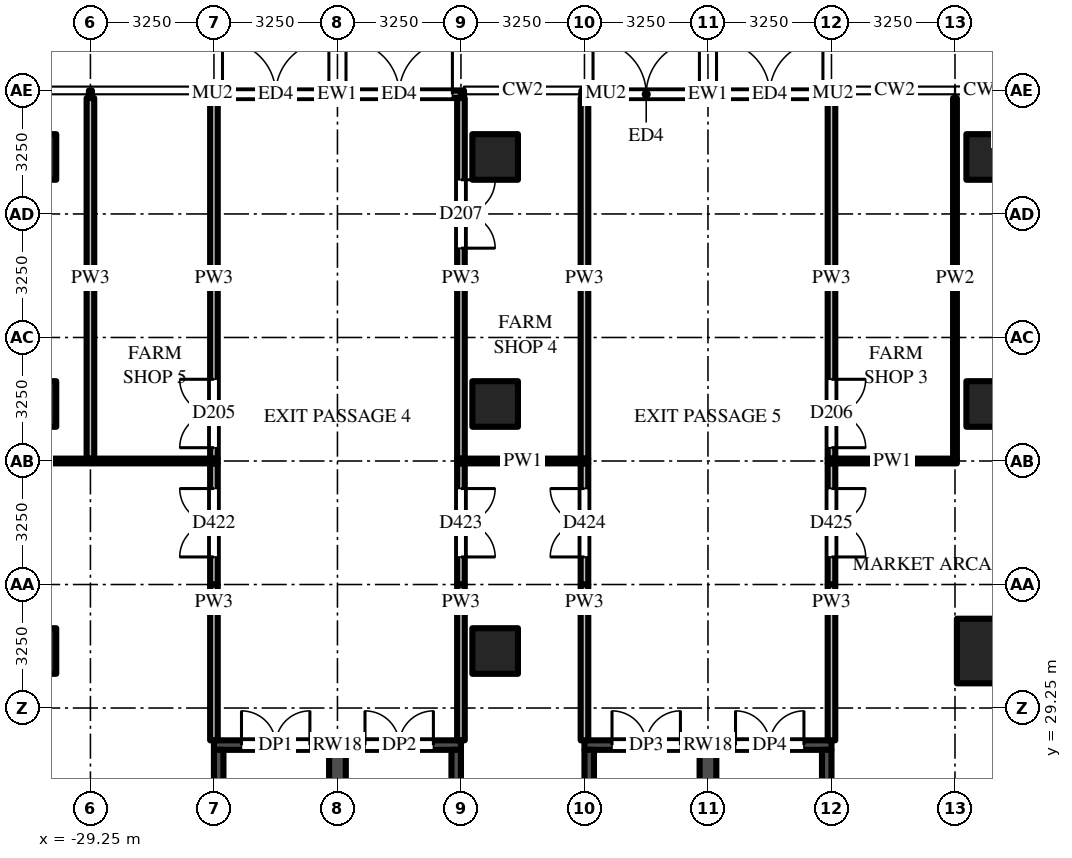
"""IFC4 building model, lengths in metres.
Left out: names, types, materials, properties, quantities, classifications, styles, units other than length and angle.
Written with IfcOpenShell. Run it as: python <this file> out.ifc"""

import sys

from ifc_helpers import new_model, si_unit, direction, frame, frame_2d, origin, origin_2d, place, context, subcontext, project, spatial, rectangle, extrude, source, transform, mapped, element, fill, save


model = new_model("IFC4")
c1 = context("Model", 3, precision=1e-05, world=origin(), true_north=direction((0.0, 1.0)))
c2 = subcontext(c1, "Body", "Model", "MODEL_VIEW")
j1 = project(units=[si_unit("LENGTHUNIT", "METRE"), si_unit("PLANEANGLEUNIT", "RADIAN")], contexts=[c1])
p1 = place(None, origin())
s1 = spatial("IfcSite", under=j1, at=p1, CompositionType="ELEMENT")
p2 = place(p1, origin())
s2 = spatial("IfcBuilding", under=s1, at=p2, CompositionType="ELEMENT")
p3 = place(p2, origin())
s3 = spatial("IfcBuildingStorey", under=s2, at=p3, CompositionType="ELEMENT", Elevation=0.0)
m1 = source(origin(), c2, "Body", "SweptSolid", [
    extrude(rectangle(XDim=1.7, YDim=1.7, at=origin_2d()), origin(), (0.0, 0.0, 1.0), 8.5),
])
p4 = place(p3, frame((-5.6, 30.75, -0.5), z_axis=(0.0, 0.0, 1.0), x_axis=(1.0, 0.0, 0.0)))
e1 = element("IfcColumn", 1, at=p4, inside=s3, PredefinedType="COLUMN", context=c2, shape_type="MappedRepresentation", body=[
    mapped(m1, transform((0.0, 0.0, 0.0))),
])
m2 = source(origin(), c2, "Body", "SweptSolid", [
    extrude(rectangle(XDim=1.2, YDim=1.2, at=origin_2d()), origin(), (0.0, 0.0, 1.0), 8.5),
])
for number, where, z_axis, x_axis in (
    (2, (-5.6, 37.25, -0.5), (0.0, 0.0, 1.0), (1.0, 0.0, 0.0)),
    (3, (-5.6, 43.75, -0.5), (0.0, 0.0, 1.0), (1.0, 0.0, 0.0)),
    (4, (-18.6, 30.75, -0.5), (0.0, 0.0, 1.0), (1.0, 0.0, 0.0)),
    (5, (-18.6, 37.25, -0.5), (0.0, 0.0, 1.0), (1.0, 0.0, 0.0)),
    (6, (-18.6, 43.75, -0.5), (0.0, 0.0, 1.0), (1.0, 0.0, 0.0)),
    (7, (-30.75, 30.75, -0.5), (0.0, 0.0, 1.0), (1.0, 0.0, 0.0)),
    (8, (-30.75, 37.25, -0.5), (0.0, 0.0, 1.0), (1.0, 0.0, 0.0)),
    (9, (-30.75, 43.75, -0.5), (0.0, 0.0, 1.0), (1.0, 0.0, 0.0)),
):
    element("IfcColumn", number, at=place(p3, frame(where, z_axis=z_axis, x_axis=x_axis)), inside=s3, PredefinedType="COLUMN", context=c2, shape_type="MappedRepresentation", body=[
        mapped(m2, transform((0.0, 0.0, 0.0))),
    ])
m3 = source(origin(), c2, "Body", "SweptSolid", [
    extrude(rectangle(XDim=6.5, YDim=0.25, at=frame_2d((3.25, 0.0))), origin(), (0.0, 0.0, 1.0), 7.7),
])
p5 = place(p3, frame((-26.0, 28.275, 0.0), z_axis=(0.0, 0.0, 1.0), x_axis=(1.0, 0.0, 0.0)))
e10 = element("IfcWall", 10, at=p5, inside=s3, PredefinedType="SHEAR", context=c2, shape_type="MappedRepresentation", body=[
    mapped(m3, transform((0.0, 0.0, 0.0))),
])
m4 = source(origin(), c2, "Body", "SweptSolid", [
    extrude(rectangle(XDim=1.8, YDim=2.1, at=frame_2d((0.9, 1.05))), frame((0.0, 0.135, 0.0), z_axis=(0.0, -1.0, 0.0), x_axis=(1.0, 0.0, 0.0)), (0.0, 0.0, 1.0), 0.27),
])
p6 = place(p5, frame((0.725, 0.0, 0.0)))
e11 = element("IfcOpeningElement", 11, at=p6, cuts=e10, PredefinedType="OPENING", context=c2, shape_type="MappedRepresentation", body=[
    mapped(m4, transform((0.0, 0.0, 0.0))),
])
p7 = place(p5, frame((3.975, 0.0, 0.0)))
e12 = element("IfcOpeningElement", 12, at=p7, cuts=e10, PredefinedType="OPENING", context=c2, shape_type="MappedRepresentation", body=[
    mapped(m4, transform((0.0, 0.0, 0.0))),
])
m5 = source(origin(), c2, "Body", "SweptSolid", [
    extrude(rectangle(XDim=8.3, YDim=0.25, at=frame_2d((4.15, 0.0))), origin(), (0.0, 0.0, 1.0), 7.7),
])
for number, where, z_axis, x_axis in (
    (13, (-25.875, 19.85, 0.0), (0.0, 0.0, 1.0), (0.0, 1.0, 0.0)),
    (14, (-19.625, 19.85, 0.0), (0.0, 0.0, 1.0), (0.0, 1.0, 0.0)),
):
    element("IfcWall", number, at=place(p3, frame(where, z_axis=z_axis, x_axis=x_axis)), inside=s3, PredefinedType="SHEAR", context=c2, shape_type="MappedRepresentation", body=[
        mapped(m5, transform((0.0, 0.0, 0.0))),
    ])
m6 = source(origin(), c2, "Body", "SweptSolid", [
    extrude(rectangle(XDim=8.3, YDim=0.44, at=frame_2d((4.15, 0.0))), origin(), (0.0, 0.0, 1.0), 7.7),
])
p8 = place(p3, frame((-22.75, 19.85, 0.0), z_axis=(0.0, 0.0, 1.0), x_axis=(0.0, 1.0, 0.0)))
e15 = element("IfcWall", 15, at=p8, inside=s3, PredefinedType="SHEAR", context=c2, shape_type="MappedRepresentation", body=[
    mapped(m6, transform((0.0, 0.0, 0.0))),
])
p9 = place(p3, frame((-16.25, 28.275, 0.0), z_axis=(0.0, 0.0, 1.0), x_axis=(1.0, 0.0, 0.0)))
e16 = element("IfcWall", 16, at=p9, inside=s3, PredefinedType="SHEAR", context=c2, shape_type="MappedRepresentation", body=[
    mapped(m3, transform((0.0, 0.0, 0.0))),
])
p10 = place(p9, frame((0.725, 0.0, 0.0)))
e17 = element("IfcOpeningElement", 17, at=p10, cuts=e16, PredefinedType="OPENING", context=c2, shape_type="MappedRepresentation", body=[
    mapped(m4, transform((0.0, 0.0, 0.0))),
])
p11 = place(p9, frame((3.975, 0.0, 0.0)))
e18 = element("IfcOpeningElement", 18, at=p11, cuts=e16, PredefinedType="OPENING", context=c2, shape_type="MappedRepresentation", body=[
    mapped(m4, transform((0.0, 0.0, 0.0))),
])
for number, where, z_axis, x_axis in (
    (19, (-16.125, 19.85, 0.0), (0.0, 0.0, 1.0), (0.0, 1.0, 0.0)),
    (20, (-9.875, 19.85, 0.0), (0.0, 0.0, 1.0), (0.0, 1.0, 0.0)),
):
    element("IfcWall", number, at=place(p3, frame(where, z_axis=z_axis, x_axis=x_axis)), inside=s3, PredefinedType="SHEAR", context=c2, shape_type="MappedRepresentation", body=[
        mapped(m5, transform((0.0, 0.0, 0.0))),
    ])
p12 = place(p3, frame((-13.0, 19.85, 0.0), z_axis=(0.0, 0.0, 1.0), x_axis=(0.0, 1.0, 0.0)))
e21 = element("IfcWall", 21, at=p12, inside=s3, PredefinedType="SHEAR", context=c2, shape_type="MappedRepresentation", body=[
    mapped(m6, transform((0.0, 0.0, 0.0))),
])
m7 = source(origin(), c2, "Body", "SweptSolid", [
    extrude(rectangle(XDim=3.25, YDim=0.2, at=frame_2d((1.625, 0.0))), origin(), (0.0, 0.0, 1.0), 7.7),
])
p13 = place(p3, frame((-13.0, 45.4, 0.0), z_axis=(0.0, 0.0, 1.0), x_axis=(1.0, 0.0, 0.0)))
e22 = element("IfcWall", 22, at=p13, inside=s3, PredefinedType="SOLIDWALL", context=c2, shape_type="MappedRepresentation", body=[
    mapped(m7, transform((0.0, 0.0, 0.0))),
])
m8 = source(origin(), c2, "Body", "SweptSolid", [
    extrude(rectangle(XDim=2.8, YDim=2.4, at=frame_2d((1.4, 1.2))), frame((0.0, 0.11, 0.0), z_axis=(0.0, -1.0, 0.0), x_axis=(1.0, 0.0, 0.0)), (0.0, 0.0, 1.0), 0.22),
])
p14 = place(p13, frame((0.225, 0.0, 0.0)))
e23 = element("IfcOpeningElement", 23, at=p14, cuts=e22, PredefinedType="OPENING", context=c2, shape_type="MappedRepresentation", body=[
    mapped(m8, transform((0.0, 0.0, 0.0))),
])
p15 = place(p3, frame((-16.25, 45.4, 0.0), z_axis=(0.0, 0.0, 1.0), x_axis=(1.0, 0.0, 0.0)))
e24 = element("IfcWall", 24, at=p15, inside=s3, PredefinedType="SOLIDWALL", context=c2, shape_type="MappedRepresentation", body=[
    mapped(m7, transform((0.0, 0.0, 0.0))),
])
p16 = place(p15, frame((0.225, 0.0, 0.0)))
e25 = element("IfcOpeningElement", 25, at=p16, cuts=e24, PredefinedType="OPENING", context=c2, shape_type="MappedRepresentation", body=[
    mapped(m8, transform((0.0, 0.0, 0.0))),
])
p17 = place(p3, frame((-22.75, 45.4, 0.0), z_axis=(0.0, 0.0, 1.0), x_axis=(1.0, 0.0, 0.0)))
e26 = element("IfcWall", 26, at=p17, inside=s3, PredefinedType="SOLIDWALL", context=c2, shape_type="MappedRepresentation", body=[
    mapped(m7, transform((0.0, 0.0, 0.0))),
])
p18 = place(p17, frame((0.225, 0.0, 0.0)))
e27 = element("IfcOpeningElement", 27, at=p18, cuts=e26, PredefinedType="OPENING", context=c2, shape_type="MappedRepresentation", body=[
    mapped(m8, transform((0.0, 0.0, 0.0))),
])
p19 = place(p3, frame((-26.0, 45.4, 0.0), z_axis=(0.0, 0.0, 1.0), x_axis=(1.0, 0.0, 0.0)))
e28 = element("IfcWall", 28, at=p19, inside=s3, PredefinedType="SOLIDWALL", context=c2, shape_type="MappedRepresentation", body=[
    mapped(m7, transform((0.0, 0.0, 0.0))),
])
p20 = place(p19, frame((0.225, 0.0, 0.0)))
e29 = element("IfcOpeningElement", 29, at=p20, cuts=e28, PredefinedType="OPENING", context=c2, shape_type="MappedRepresentation", body=[
    mapped(m8, transform((0.0, 0.0, 0.0))),
])
m9 = source(origin(), c2, "Body", "SweptSolid", [
    extrude(rectangle(XDim=9.488, YDim=0.2, at=frame_2d((4.744, 0.0))), origin(), (0.0, 0.0, 1.0), 6.839),
])
p21 = place(p3, frame((-29.25, 35.812, 0.0), z_axis=(0.0, 0.0, 1.0), x_axis=(0.0, 1.0, 0.0)))
e30 = element("IfcWall", 30, at=p21, inside=s3, PredefinedType="PARTITIONING", context=c2, shape_type="MappedRepresentation", body=[
    mapped(m9, transform((0.0, 0.0, 0.0))),
])
m10 = source(origin(), c2, "Body", "SweptSolid", [
    extrude(rectangle(XDim=3.188, YDim=0.2, at=frame_2d((1.594, 0.0))), origin(), (0.0, 0.0, 1.0), 6.997),
])
p22 = place(p3, frame((-26.0, 32.5, 0.0), z_axis=(0.0, 0.0, 1.0), x_axis=(0.0, 1.0, 0.0)))
e31 = element("IfcWall", 31, at=p22, inside=s3, PredefinedType="PARTITIONING", context=c2, shape_type="MappedRepresentation", body=[
    mapped(m10, transform((0.0, 0.0, 0.0))),
])
m11 = source(origin(), c2, "Body", "SweptSolid", [
    extrude(rectangle(XDim=1.8, YDim=2.1, at=frame_2d((0.9, 1.05))), frame((0.0, 0.11, 0.0), z_axis=(0.0, -1.0, 0.0), x_axis=(1.0, 0.0, 0.0)), (0.0, 0.0, 1.0), 0.22),
])
p23 = place(p22, frame((0.725, 0.0, 0.0)))
e32 = element("IfcOpeningElement", 32, at=p23, cuts=e31, PredefinedType="OPENING", context=c2, shape_type="MappedRepresentation", body=[
    mapped(m11, transform((0.0, 0.0, 0.0))),
])
m12 = source(origin(), c2, "Body", "SweptSolid", [
    extrude(rectangle(XDim=4.1, YDim=0.2, at=frame_2d((2.05, 0.0))), origin(), (0.0, 0.0, 1.0), 6.839),
])
p24 = place(p3, frame((-26.0, 32.5, 0.0), z_axis=(0.0, 0.0, 1.0), x_axis=(0.0, -1.0, 0.0)))
e33 = element("IfcWall", 33, at=p24, inside=s3, PredefinedType="PARTITIONING", context=c2, shape_type="MappedRepresentation", body=[
    mapped(m12, transform((0.0, 0.0, 0.0))),
])
p25 = place(p3, frame((-26.0, 35.812, 0.0), z_axis=(0.0, 0.0, 1.0), x_axis=(0.0, 1.0, 0.0)))
e34 = element("IfcWall", 34, at=p25, inside=s3, PredefinedType="PARTITIONING", context=c2, shape_type="MappedRepresentation", body=[
    mapped(m9, transform((0.0, 0.0, 0.0))),
])
p26 = place(p25, frame((0.288, 0.0, 0.0)))
e35 = element("IfcOpeningElement", 35, at=p26, cuts=e34, PredefinedType="OPENING", context=c2, shape_type="MappedRepresentation", body=[
    mapped(m11, transform((0.0, 0.0, 0.0))),
])
p27 = place(p3, frame((-19.5, 35.688, 0.0), z_axis=(0.0, 0.0, 1.0), x_axis=(0.0, -1.0, 0.0)))
e36 = element("IfcWall", 36, at=p27, inside=s3, PredefinedType="PARTITIONING", context=c2, shape_type="MappedRepresentation", body=[
    mapped(m10, transform((0.0, 0.0, 0.0))),
])
p28 = place(p27, frame((0.663, 0.0, 0.0)))
e37 = element("IfcOpeningElement", 37, at=p28, cuts=e36, PredefinedType="OPENING", context=c2, shape_type="MappedRepresentation", body=[
    mapped(m11, transform((0.0, 0.0, 0.0))),
])
p29 = place(p3, frame((-19.5, 32.5, 0.0), z_axis=(0.0, 0.0, 1.0), x_axis=(0.0, -1.0, 0.0)))
e38 = element("IfcWall", 38, at=p29, inside=s3, PredefinedType="PARTITIONING", context=c2, shape_type="MappedRepresentation", body=[
    mapped(m12, transform((0.0, 0.0, 0.0))),
])
p30 = place(p3, frame((-19.5, 45.3, 0.0), z_axis=(0.0, 0.0, 1.0), x_axis=(0.0, -1.0, 0.0)))
e39 = element("IfcWall", 39, at=p30, inside=s3, PredefinedType="PARTITIONING", context=c2, shape_type="MappedRepresentation", body=[
    mapped(m9, transform((0.0, 0.0, 0.0))),
])
p31 = place(p30, frame((2.15, 0.0, 0.0)))
e40 = element("IfcOpeningElement", 40, at=p31, cuts=e39, PredefinedType="OPENING", context=c2, shape_type="MappedRepresentation", body=[
    mapped(m11, transform((0.0, 0.0, 0.0))),
])
p32 = place(p3, frame((-16.25, 32.5, 0.0), z_axis=(0.0, 0.0, 1.0), x_axis=(0.0, 1.0, 0.0)))
e41 = element("IfcWall", 41, at=p32, inside=s3, PredefinedType="PARTITIONING", context=c2, shape_type="MappedRepresentation", body=[
    mapped(m10, transform((0.0, 0.0, 0.0))),
])
p33 = place(p32, frame((0.725, 0.0, 0.0)))
e42 = element("IfcOpeningElement", 42, at=p33, cuts=e41, PredefinedType="OPENING", context=c2, shape_type="MappedRepresentation", body=[
    mapped(m11, transform((0.0, 0.0, 0.0))),
])
m13 = source(origin(), c2, "Body", "SweptSolid", [
    extrude(rectangle(XDim=4.1, YDim=0.2, at=frame_2d((2.05, 0.0))), origin(), (0.0, 0.0, 1.0), 6.762),
])
p34 = place(p3, frame((-16.25, 28.4, 0.0), z_axis=(0.0, 0.0, 1.0), x_axis=(0.0, 1.0, 0.0)))
e43 = element("IfcWall", 43, at=p34, inside=s3, PredefinedType="PARTITIONING", context=c2, shape_type="MappedRepresentation", body=[
    mapped(m13, transform((0.0, 0.0, 0.0))),
])
m14 = source(origin(), c2, "Body", "SweptSolid", [
    extrude(rectangle(XDim=9.488, YDim=0.2, at=frame_2d((4.744, 0.0))), origin(), (0.0, 0.0, 1.0), 6.762),
])
p35 = place(p3, frame((-16.25, 35.812, 0.0), z_axis=(0.0, 0.0, 1.0), x_axis=(0.0, 1.0, 0.0)))
e44 = element("IfcWall", 44, at=p35, inside=s3, PredefinedType="PARTITIONING", context=c2, shape_type="MappedRepresentation", body=[
    mapped(m14, transform((0.0, 0.0, 0.0))),
])
p36 = place(p3, frame((-9.75, 35.688, 0.0), z_axis=(0.0, 0.0, 1.0), x_axis=(0.0, -1.0, 0.0)))
e45 = element("IfcWall", 45, at=p36, inside=s3, PredefinedType="PARTITIONING", context=c2, shape_type="MappedRepresentation", body=[
    mapped(m10, transform((0.0, 0.0, 0.0))),
])
p37 = place(p36, frame((0.663, 0.0, 0.0)))
e46 = element("IfcOpeningElement", 46, at=p37, cuts=e45, PredefinedType="OPENING", context=c2, shape_type="MappedRepresentation", body=[
    mapped(m11, transform((0.0, 0.0, 0.0))),
])
p38 = place(p3, frame((-9.75, 45.3, 0.0), z_axis=(0.0, 0.0, 1.0), x_axis=(0.0, -1.0, 0.0)))
e47 = element("IfcWall", 47, at=p38, inside=s3, PredefinedType="PARTITIONING", context=c2, shape_type="MappedRepresentation", body=[
    mapped(m14, transform((0.0, 0.0, 0.0))),
])
p39 = place(p38, frame((7.4, 0.0, 0.0)))
e48 = element("IfcOpeningElement", 48, at=p39, cuts=e47, PredefinedType="OPENING", context=c2, shape_type="MappedRepresentation", body=[
    mapped(m11, transform((0.0, 0.0, 0.0))),
])
p40 = place(p3, frame((-9.75, 28.4, 0.0), z_axis=(0.0, 0.0, 1.0), x_axis=(0.0, 1.0, 0.0)))
e49 = element("IfcWall", 49, at=p40, inside=s3, PredefinedType="PARTITIONING", context=c2, shape_type="MappedRepresentation", body=[
    mapped(m13, transform((0.0, 0.0, 0.0))),
])
p41 = place(p3, frame((-6.5, 35.812, 0.0), z_axis=(0.0, 0.0, 1.0), x_axis=(0.0, 1.0, 0.0)))
e50 = element("IfcWall", 50, at=p41, inside=s3, PredefinedType="PARTITIONING", context=c2, shape_type="SweptSolid", body=[
    extrude(rectangle(XDim=9.488, YDim=0.1, at=frame_2d((4.744, 0.0))), origin(), (0.0, 0.0, 1.0), 6.762),
])
m15 = source(origin(), c2, "Body", "SweptSolid", [
    extrude(rectangle(XDim=9.85, YDim=0.125, at=frame_2d((4.925, 0.0))), origin(), (0.0, 0.0, 1.0), 6.997),
])
p42 = place(p3, frame((-35.75, 35.75, 0.0), z_axis=(0.0, 0.0, 1.0), x_axis=(1.0, 0.0, 0.0)))
e51 = element("IfcWall", 51, at=p42, inside=s3, PredefinedType="PARTITIONING", context=c2, shape_type="MappedRepresentation", body=[
    mapped(m15, transform((0.0, 0.0, 0.0))),
])
m16 = source(origin(), c2, "Body", "SweptSolid", [
    extrude(rectangle(XDim=1.0, YDim=2.1, at=frame_2d((0.5, 1.05))), frame((0.0, 0.073, 0.0), z_axis=(0.0, -1.0, 0.0), x_axis=(1.0, 0.0, 0.0)), (0.0, 0.0, 1.0), 0.145),
])
p43 = place(p42, frame((0.35, 0.0, 0.0)))
e52 = element("IfcOpeningElement", 52, at=p43, cuts=e51, PredefinedType="OPENING", context=c2, shape_type="MappedRepresentation", body=[
    mapped(m16, transform((0.0, 0.0, 0.0))),
])
m17 = source(origin(), c2, "Body", "SweptSolid", [
    extrude(rectangle(XDim=3.45, YDim=0.125, at=frame_2d((1.725, 0.0))), origin(), (0.0, 0.0, 1.0), 6.997),
])
p44 = place(p3, frame((-19.6, 35.75, 0.0), z_axis=(0.0, 0.0, 1.0), x_axis=(1.0, 0.0, 0.0)))
e53 = element("IfcWall", 53, at=p44, inside=s3, PredefinedType="PARTITIONING", context=c2, shape_type="MappedRepresentation", body=[
    mapped(m17, transform((0.0, 0.0, 0.0))),
])
p45 = place(p3, frame((-9.85, 35.75, 0.0), z_axis=(0.0, 0.0, 1.0), x_axis=(1.0, 0.0, 0.0)))
e54 = element("IfcWall", 54, at=p45, inside=s3, PredefinedType="PARTITIONING", context=c2, shape_type="SweptSolid", body=[
    extrude(rectangle(XDim=3.4, YDim=0.125, at=frame_2d((1.7, 0.0))), origin(), (0.0, 0.0, 1.0), 7.7),
])
m18 = source(origin(), c2, "Body", "SweptSolid", [
    extrude(rectangle(XDim=1.8, YDim=2.1, at=frame_2d((0.9, 1.05))), frame((0.0, 0.025, 0.0), z_axis=(0.0, -1.0, 0.0), x_axis=(1.0, 0.0, 0.0)), (0.0, 0.0, 1.0), 0.05),
])
p46 = place(p6, origin())
e55 = element("IfcDoor", 55, at=p46, inside=s3, OperationType="DOUBLE_DOOR_SINGLE_SWING", PredefinedType="DOOR", context=c2, shape_type="MappedRepresentation", body=[
    mapped(m18, transform((0.0, 0.0, 0.0))),
])
fill(e11, e55)
p47 = place(p7, origin())
e56 = element("IfcDoor", 56, at=p47, inside=s3, OperationType="DOUBLE_DOOR_SINGLE_SWING", PredefinedType="DOOR", context=c2, shape_type="MappedRepresentation", body=[
    mapped(m18, transform((0.0, 0.0, 0.0))),
])
fill(e12, e56)
p48 = place(p10, origin())
e57 = element("IfcDoor", 57, at=p48, inside=s3, OperationType="DOUBLE_DOOR_SINGLE_SWING", PredefinedType="DOOR", context=c2, shape_type="MappedRepresentation", body=[
    mapped(m18, transform((0.0, 0.0, 0.0))),
])
fill(e17, e57)
p49 = place(p11, origin())
e58 = element("IfcDoor", 58, at=p49, inside=s3, OperationType="DOUBLE_DOOR_SINGLE_SWING", PredefinedType="DOOR", context=c2, shape_type="MappedRepresentation", body=[
    mapped(m18, transform((0.0, 0.0, 0.0))),
])
fill(e18, e58)
m19 = source(origin(), c2, "Body", "SweptSolid", [
    extrude(rectangle(XDim=2.8, YDim=2.4, at=frame_2d((1.4, 1.2))), frame((0.0, 0.025, 0.0), z_axis=(0.0, -1.0, 0.0), x_axis=(1.0, 0.0, 0.0)), (0.0, 0.0, 1.0), 0.05),
])
p50 = place(p14, origin())
e59 = element("IfcDoor", 59, at=p50, inside=s3, OperationType="DOUBLE_DOOR_SINGLE_SWING", PredefinedType="DOOR", context=c2, shape_type="MappedRepresentation", body=[
    mapped(m19, transform((0.0, 0.0, 0.0))),
])
fill(e23, e59)
p51 = place(p16, origin())
e60 = element("IfcDoor", 60, at=p51, inside=s3, OperationType="DOUBLE_DOOR_SINGLE_SWING", PredefinedType="DOOR", context=c2, shape_type="MappedRepresentation", body=[
    mapped(m19, transform((0.0, 0.0, 0.0))),
])
fill(e25, e60)
p52 = place(p18, origin())
e61 = element("IfcDoor", 61, at=p52, inside=s3, OperationType="DOUBLE_DOOR_SINGLE_SWING", PredefinedType="DOOR", context=c2, shape_type="MappedRepresentation", body=[
    mapped(m19, transform((0.0, 0.0, 0.0))),
])
fill(e27, e61)
p53 = place(p20, origin())
e62 = element("IfcDoor", 62, at=p53, inside=s3, OperationType="DOUBLE_DOOR_SINGLE_SWING", PredefinedType="DOOR", context=c2, shape_type="MappedRepresentation", body=[
    mapped(m19, transform((0.0, 0.0, 0.0))),
])
fill(e29, e62)
p54 = place(p23, origin())
e63 = element("IfcDoor", 63, at=p54, inside=s3, OperationType="DOUBLE_DOOR_SINGLE_SWING", PredefinedType="DOOR", context=c2, shape_type="MappedRepresentation", body=[
    mapped(m18, transform((0.0, 0.0, 0.0))),
])
fill(e32, e63)
p55 = place(p28, origin())
e64 = element("IfcDoor", 64, at=p55, inside=s3, OperationType="DOUBLE_DOOR_SINGLE_SWING", PredefinedType="DOOR", context=c2, shape_type="MappedRepresentation", body=[
    mapped(m18, transform((0.0, 0.0, 0.0))),
])
fill(e37, e64)
p56 = place(p33, origin())
e65 = element("IfcDoor", 65, at=p56, inside=s3, OperationType="DOUBLE_DOOR_SINGLE_SWING", PredefinedType="DOOR", context=c2, shape_type="MappedRepresentation", body=[
    mapped(m18, transform((0.0, 0.0, 0.0))),
])
fill(e42, e65)
p57 = place(p37, origin())
e66 = element("IfcDoor", 66, at=p57, inside=s3, OperationType="DOUBLE_DOOR_SINGLE_SWING", PredefinedType="DOOR", context=c2, shape_type="MappedRepresentation", body=[
    mapped(m18, transform((0.0, 0.0, 0.0))),
])
fill(e46, e66)
p58 = place(p26, origin())
e67 = element("IfcDoor", 67, at=p58, inside=s3, OperationType="DOUBLE_DOOR_SINGLE_SWING", PredefinedType="DOOR", context=c2, shape_type="MappedRepresentation", body=[
    mapped(m18, transform((0.0, 0.0, 0.0))),
])
fill(e35, e67)
p59 = place(p39, origin())
e68 = element("IfcDoor", 68, at=p59, inside=s3, OperationType="DOUBLE_DOOR_SINGLE_SWING", PredefinedType="DOOR", context=c2, shape_type="MappedRepresentation", body=[
    mapped(m18, transform((0.0, 0.0, 0.0))),
])
fill(e48, e68)
p60 = place(p31, origin())
e69 = element("IfcDoor", 69, at=p60, inside=s3, OperationType="DOUBLE_DOOR_SINGLE_SWING", PredefinedType="DOOR", context=c2, shape_type="MappedRepresentation", body=[
    mapped(m18, transform((0.0, 0.0, 0.0))),
])
fill(e40, e69)
save(model, sys.argv[1])
